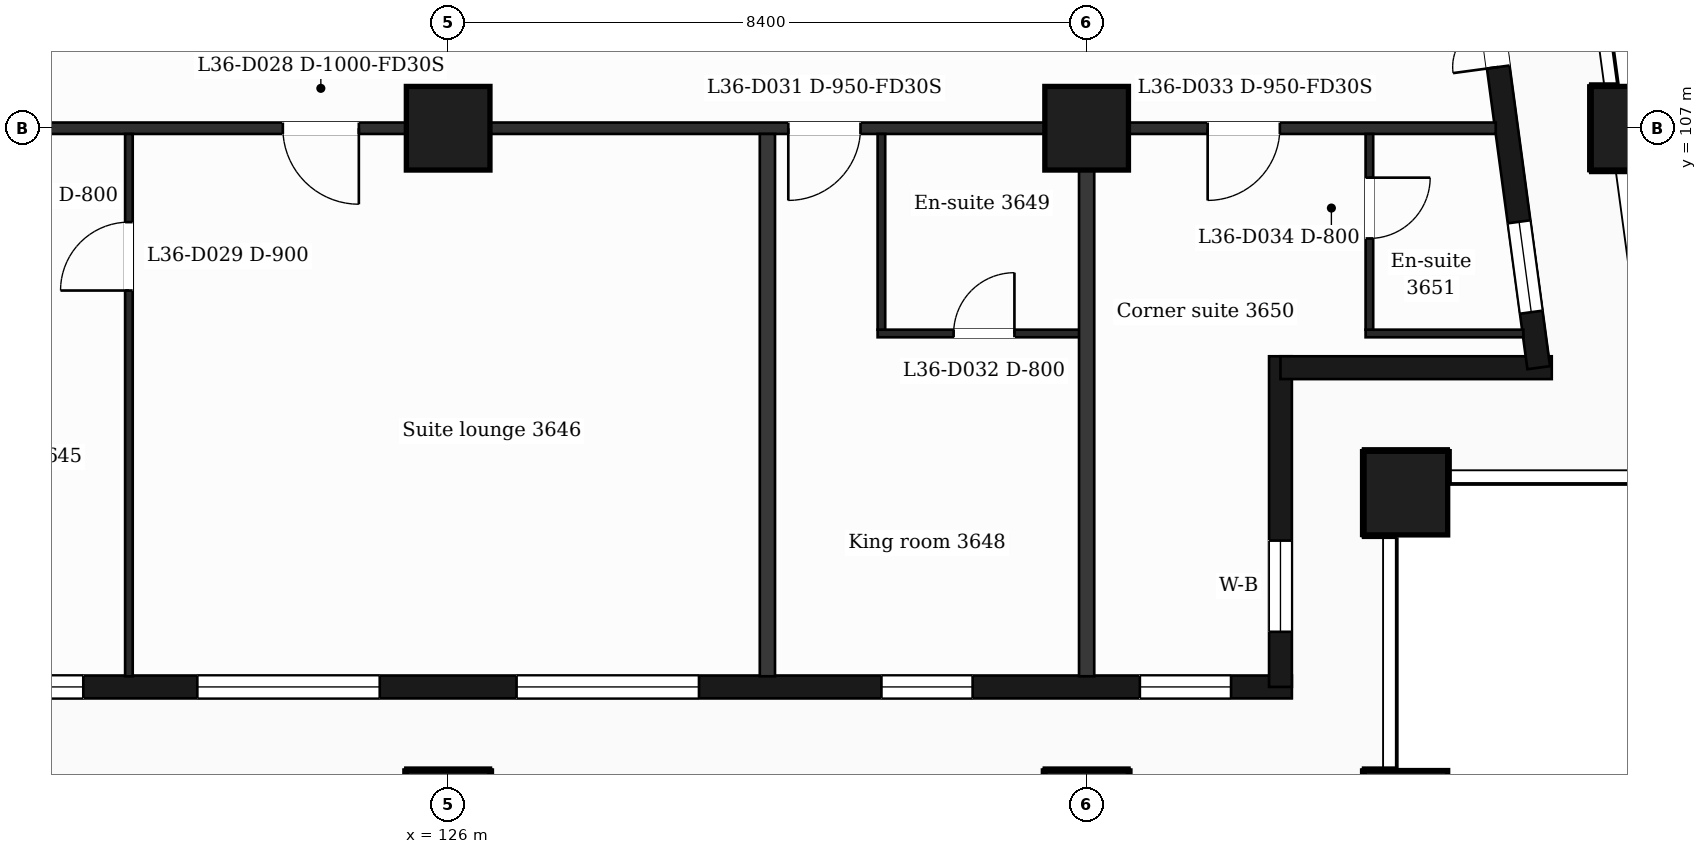
"""IFC4 building model, lengths in metres.
Left out: names, types, materials, properties, quantities, classifications, styles, units other than length and angle.
Written with IfcOpenShell. Run it as: python <this file> out.ifc"""

import sys

from ifc_helpers import new_model, si_unit, direction, frame, frame_2d, origin, origin_2d, place, context, subcontext, project, spatial, rectangle, extrude, element, fill, save


model = new_model("IFC4")
c1 = context("Model", 3, precision=1e-05, world=origin(), true_north=direction((0.0, 1.0)))
c2 = subcontext(c1, "Body", "Model", "MODEL_VIEW")
j1 = project(units=[si_unit("LENGTHUNIT", "METRE"), si_unit("PLANEANGLEUNIT", "RADIAN")], contexts=[c1])
p1 = place(None, origin())
s1 = spatial("IfcSite", under=j1, at=p1, CompositionType="ELEMENT")
p2 = place(p1, origin())
s2 = spatial("IfcBuilding", under=s1, at=p2, CompositionType="ELEMENT")
p3 = place(p2, frame((0.0, 0.0, 155.2)))
s3 = spatial("IfcBuildingStorey", under=s2, at=p3, CompositionType="ELEMENT", Elevation=155.2)
for number, where, z_axis, x_axis in (
    (1, (126.0, 98.0, 0.0), (0.0, 0.0, 1.0), (1.0, 0.0, 0.0)),
    (2, (134.4, 98.0, 0.0), (0.0, 0.0, 1.0), (1.0, 0.0, 0.0)),
    (3, (138.6, 98.0, 0.0), (0.0, 0.0, 1.0), (1.0, 0.0, 0.0)),
    (4, (138.6, 102.2, 0.0), (0.0, 0.0, 1.0), (1.0, 0.0, 0.0)),
    (5, (126.0, 107.0, 0.0), (0.0, 0.0, 1.0), (1.0, 0.0, 0.0)),
    (6, (134.4, 107.0, 0.0), (0.0, 0.0, 1.0), (1.0, 0.0, 0.0)),
    (7, (141.588, 107.0, 0.0), (0.0, 0.0, 1.0), (1.0, 0.0, 0.0)),
):
    element("IfcColumn", number, at=place(p3, frame(where, z_axis=z_axis, x_axis=x_axis)), inside=s3, PredefinedType="COLUMN", context=c2, shape_type="SweptSolid", body=[
        extrude(rectangle(XDim=1.1, YDim=1.1, at=origin_2d()), origin(), (0.0, 0.0, 1.0), 3.7),
    ])
p4 = place(p3, frame((89.85, 99.65, 0.0), z_axis=(0.0, 0.0, 1.0), x_axis=(1.0, 0.0, 0.0)))
e8 = element("IfcWall", 8, at=p4, inside=s3, PredefinedType="SOLIDWALL", context=c2, shape_type="SweptSolid", body=[
    extrude(rectangle(XDim=47.25, YDim=0.3, at=frame_2d((23.625, 0.0))), origin(), (0.0, 0.0, 1.0), 3.38),
])
p5 = place(p4, frame((0.725, 0.0, 0.9)))
e9 = element("IfcOpeningElement", 9, at=p5, cuts=e8, PredefinedType="OPENING", context=c2, shape_type="SweptSolid", body=[
    extrude(rectangle(XDim=1.2, YDim=2.1, at=frame_2d((0.6, 1.05))), frame((0.0, 0.16, 0.0), z_axis=(0.0, -1.0, 0.0), x_axis=(1.0, 0.0, 0.0)), (0.0, 0.0, 1.0), 0.32),
])
p6 = place(p4, frame((3.45, 0.0, 0.9)))
e10 = element("IfcOpeningElement", 10, at=p6, cuts=e8, PredefinedType="OPENING", context=c2, shape_type="SweptSolid", body=[
    extrude(rectangle(XDim=2.4, YDim=2.1, at=frame_2d((1.2, 1.05))), frame((0.0, 0.16, 0.0), z_axis=(0.0, -1.0, 0.0), x_axis=(1.0, 0.0, 0.0)), (0.0, 0.0, 1.0), 0.32),
])
p7 = place(p4, frame((7.65, 0.0, 0.9)))
e11 = element("IfcOpeningElement", 11, at=p7, cuts=e8, PredefinedType="OPENING", context=c2, shape_type="SweptSolid", body=[
    extrude(rectangle(XDim=2.4, YDim=2.1, at=frame_2d((1.2, 1.05))), frame((0.0, 0.16, 0.0), z_axis=(0.0, -1.0, 0.0), x_axis=(1.0, 0.0, 0.0)), (0.0, 0.0, 1.0), 0.32),
])
p8 = place(p4, frame((12.45, 0.0, 0.9)))
e12 = element("IfcOpeningElement", 12, at=p8, cuts=e8, PredefinedType="OPENING", context=c2, shape_type="SweptSolid", body=[
    extrude(rectangle(XDim=1.2, YDim=2.1, at=frame_2d((0.6, 1.05))), frame((0.0, 0.16, 0.0), z_axis=(0.0, -1.0, 0.0), x_axis=(1.0, 0.0, 0.0)), (0.0, 0.0, 1.0), 0.32),
])
p9 = place(p4, frame((16.65, 0.0, 0.9)))
e13 = element("IfcOpeningElement", 13, at=p9, cuts=e8, PredefinedType="OPENING", context=c2, shape_type="SweptSolid", body=[
    extrude(rectangle(XDim=1.2, YDim=2.1, at=frame_2d((0.6, 1.05))), frame((0.0, 0.16, 0.0), z_axis=(0.0, -1.0, 0.0), x_axis=(1.0, 0.0, 0.0)), (0.0, 0.0, 1.0), 0.32),
])
p10 = place(p4, frame((19.95, 0.0, 0.0)))
e14 = element("IfcOpeningElement", 14, at=p10, cuts=e8, PredefinedType="OPENING", context=c2, shape_type="SweptSolid", body=[
    extrude(rectangle(XDim=1.2, YDim=2.4, at=frame_2d((0.6, 1.2))), frame((0.0, 0.16, 0.0), z_axis=(0.0, -1.0, 0.0), x_axis=(1.0, 0.0, 0.0)), (0.0, 0.0, 1.0), 0.32),
])
p11 = place(p4, frame((21.75, 0.0, 0.9)))
e15 = element("IfcOpeningElement", 15, at=p11, cuts=e8, PredefinedType="OPENING", context=c2, shape_type="SweptSolid", body=[
    extrude(rectangle(XDim=1.2, YDim=2.1, at=frame_2d((0.6, 1.05))), frame((0.0, 0.16, 0.0), z_axis=(0.0, -1.0, 0.0), x_axis=(1.0, 0.0, 0.0)), (0.0, 0.0, 1.0), 0.32),
])
p12 = place(p4, frame((24.45, 0.0, 0.9)))
e16 = element("IfcOpeningElement", 16, at=p12, cuts=e8, PredefinedType="OPENING", context=c2, shape_type="SweptSolid", body=[
    extrude(rectangle(XDim=2.4, YDim=2.1, at=frame_2d((1.2, 1.05))), frame((0.0, 0.16, 0.0), z_axis=(0.0, -1.0, 0.0), x_axis=(1.0, 0.0, 0.0)), (0.0, 0.0, 1.0), 0.32),
])
p13 = place(p4, frame((28.35, 0.0, 0.0)))
e17 = element("IfcOpeningElement", 17, at=p13, cuts=e8, PredefinedType="OPENING", context=c2, shape_type="SweptSolid", body=[
    extrude(rectangle(XDim=1.2, YDim=2.4, at=frame_2d((0.6, 1.2))), frame((0.0, 0.16, 0.0), z_axis=(0.0, -1.0, 0.0), x_axis=(1.0, 0.0, 0.0)), (0.0, 0.0, 1.0), 0.32),
])
p14 = place(p4, frame((30.15, 0.0, 0.9)))
e18 = element("IfcOpeningElement", 18, at=p14, cuts=e8, PredefinedType="OPENING", context=c2, shape_type="SweptSolid", body=[
    extrude(rectangle(XDim=1.2, YDim=2.1, at=frame_2d((0.6, 1.05))), frame((0.0, 0.16, 0.0), z_axis=(0.0, -1.0, 0.0), x_axis=(1.0, 0.0, 0.0)), (0.0, 0.0, 1.0), 0.32),
])
p15 = place(p4, frame((32.85, 0.0, 0.9)))
e19 = element("IfcOpeningElement", 19, at=p15, cuts=e8, PredefinedType="OPENING", context=c2, shape_type="SweptSolid", body=[
    extrude(rectangle(XDim=2.4, YDim=2.1, at=frame_2d((1.2, 1.05))), frame((0.0, 0.16, 0.0), z_axis=(0.0, -1.0, 0.0), x_axis=(1.0, 0.0, 0.0)), (0.0, 0.0, 1.0), 0.32),
])
p16 = place(p4, frame((37.05, 0.0, 0.9)))
e20 = element("IfcOpeningElement", 20, at=p16, cuts=e8, PredefinedType="OPENING", context=c2, shape_type="SweptSolid", body=[
    extrude(rectangle(XDim=2.4, YDim=2.1, at=frame_2d((1.2, 1.05))), frame((0.0, 0.16, 0.0), z_axis=(0.0, -1.0, 0.0), x_axis=(1.0, 0.0, 0.0)), (0.0, 0.0, 1.0), 0.32),
])
p17 = place(p4, frame((41.85, 0.0, 0.9)))
e21 = element("IfcOpeningElement", 21, at=p17, cuts=e8, PredefinedType="OPENING", context=c2, shape_type="SweptSolid", body=[
    extrude(rectangle(XDim=1.2, YDim=2.1, at=frame_2d((0.6, 1.05))), frame((0.0, 0.16, 0.0), z_axis=(0.0, -1.0, 0.0), x_axis=(1.0, 0.0, 0.0)), (0.0, 0.0, 1.0), 0.32),
])
p18 = place(p4, frame((45.25, 0.0, 0.9)))
e22 = element("IfcOpeningElement", 22, at=p18, cuts=e8, PredefinedType="OPENING", context=c2, shape_type="SweptSolid", body=[
    extrude(rectangle(XDim=1.2, YDim=2.1, at=frame_2d((0.6, 1.05))), frame((0.0, 0.16, 0.0), z_axis=(0.0, -1.0, 0.0), x_axis=(1.0, 0.0, 0.0)), (0.0, 0.0, 1.0), 0.32),
])
p19 = place(p3, frame((136.95, 99.65, 0.0), z_axis=(0.0, 0.0, 1.0), x_axis=(0.0, 1.0, 0.0)))
e23 = element("IfcWall", 23, at=p19, inside=s3, PredefinedType="SOLIDWALL", context=c2, shape_type="SweptSolid", body=[
    extrude(rectangle(XDim=4.35, YDim=0.3, at=frame_2d((2.175, 0.0))), origin(), (0.0, 0.0, 1.0), 3.38),
])
p20 = place(p19, frame((0.725, 0.0, 0.9)))
e24 = element("IfcOpeningElement", 24, at=p20, cuts=e23, PredefinedType="OPENING", context=c2, shape_type="SweptSolid", body=[
    extrude(rectangle(XDim=1.2, YDim=2.1, at=frame_2d((0.6, 1.05))), frame((0.0, 0.16, 0.0), z_axis=(0.0, -1.0, 0.0), x_axis=(1.0, 0.0, 0.0)), (0.0, 0.0, 1.0), 0.32),
])
p21 = place(p3, frame((136.95, 103.85, 0.0), z_axis=(0.0, 0.0, 1.0), x_axis=(1.0, 0.0, 0.0)))
e25 = element("IfcWall", 25, at=p21, inside=s3, PredefinedType="SOLIDWALL", context=c2, shape_type="SweptSolid", body=[
    extrude(rectangle(XDim=3.569, YDim=0.3, at=frame_2d((1.785, 0.0))), origin(), (0.0, 0.0, 1.0), 3.38),
])
p22 = place(p3, frame((140.348, 103.85, 0.0), z_axis=(0.0, 0.0, 1.0), x_axis=(-0.133431549479, 0.991058031401, 0.0)))
e26 = element("IfcWall", 26, at=p22, inside=s3, PredefinedType="SOLIDWALL", context=c2, shape_type="SweptSolid", body=[
    extrude(rectangle(XDim=6.609, YDim=0.3, at=frame_2d((3.304, 0.0))), origin(), (0.0, 0.0, 1.0), 3.38),
])
p23 = place(p22, frame((0.737, 0.0, 0.9)))
e27 = element("IfcOpeningElement", 27, at=p23, cuts=e26, PredefinedType="OPENING", context=c2, shape_type="SweptSolid", body=[
    extrude(rectangle(XDim=1.2, YDim=2.1, at=frame_2d((0.6, 1.05))), frame((0.0, 0.16, 0.0), z_axis=(0.0, -1.0, 0.0), x_axis=(1.0, 0.0, 0.0)), (0.0, 0.0, 1.0), 0.32),
])
p24 = place(p22, frame((3.991, 0.0, 0.0)))
e28 = element("IfcOpeningElement", 28, at=p24, cuts=e26, PredefinedType="OPENING", context=c2, shape_type="SweptSolid", body=[
    extrude(rectangle(XDim=1.2, YDim=2.4, at=frame_2d((0.6, 1.2))), frame((0.0, 0.16, 0.0), z_axis=(0.0, -1.0, 0.0), x_axis=(1.0, 0.0, 0.0)), (0.0, 0.0, 1.0), 0.32),
])
p25 = place(p3, frame((131.65, 104.3, 0.0), z_axis=(0.0, 0.0, 1.0), x_axis=(1.0, 0.0, 0.0)))
e29 = element("IfcWall", 29, at=p25, inside=s3, PredefinedType="PARTITIONING", context=c2, shape_type="SweptSolid", body=[
    extrude(rectangle(XDim=2.75, YDim=0.1, at=frame_2d((1.375, 0.0))), origin(), (0.0, 0.0, 1.0), 3.38),
])
p26 = place(p25, frame((1.0, 0.0, 0.0)))
e30 = element("IfcOpeningElement", 30, at=p26, cuts=e29, PredefinedType="OPENING", context=c2, shape_type="SweptSolid", body=[
    extrude(rectangle(XDim=0.8, YDim=2.1, at=frame_2d((0.4, 1.05))), frame((0.0, 0.06, 0.0), z_axis=(0.0, -1.0, 0.0), x_axis=(1.0, 0.0, 0.0)), (0.0, 0.0, 1.0), 0.12),
])
p27 = place(p3, frame((138.07, 104.3, 0.0), z_axis=(0.0, 0.0, 1.0), x_axis=(1.0, 0.0, 0.0)))
e31 = element("IfcWall", 31, at=p27, inside=s3, PredefinedType="PARTITIONING", context=c2, shape_type="SweptSolid", body=[
    extrude(rectangle(XDim=2.076, YDim=0.1, at=frame_2d((1.038, 0.0))), origin(), (0.0, 0.0, 1.0), 3.38),
])
p28 = place(p3, frame((87.018, 107.0, 0.0), z_axis=(0.0, 0.0, 1.0), x_axis=(1.0, 0.0, 0.0)))
e32 = element("IfcWall", 32, at=p28, inside=s3, PredefinedType="PARTITIONING", context=c2, shape_type="SweptSolid", body=[
    extrude(rectangle(XDim=52.765, YDim=0.15, at=frame_2d((26.382, 0.0))), origin(), (0.0, 0.0, 1.0), 3.38),
])
p29 = place(p28, frame((0.707, 0.0, 0.0)))
e33 = element("IfcOpeningElement", 33, at=p29, cuts=e32, PredefinedType="OPENING", context=c2, shape_type="SweptSolid", body=[
    extrude(rectangle(XDim=0.95, YDim=2.1, at=frame_2d((0.475, 1.05))), frame((0.0, 0.085, 0.0), z_axis=(0.0, -1.0, 0.0), x_axis=(1.0, 0.0, 0.0)), (0.0, 0.0, 1.0), 0.17),
])
p30 = place(p28, frame((7.645, 0.0, 0.0)))
e34 = element("IfcOpeningElement", 34, at=p30, cuts=e32, PredefinedType="OPENING", context=c2, shape_type="SweptSolid", body=[
    extrude(rectangle(XDim=0.95, YDim=2.1, at=frame_2d((0.475, 1.05))), frame((0.0, 0.085, 0.0), z_axis=(0.0, -1.0, 0.0), x_axis=(1.0, 0.0, 0.0)), (0.0, 0.0, 1.0), 0.17),
])
p31 = place(p28, frame((12.067, 0.0, 0.0)))
e35 = element("IfcOpeningElement", 35, at=p31, cuts=e32, PredefinedType="OPENING", context=c2, shape_type="SweptSolid", body=[
    extrude(rectangle(XDim=0.95, YDim=2.1, at=frame_2d((0.475, 1.05))), frame((0.0, 0.085, 0.0), z_axis=(0.0, -1.0, 0.0), x_axis=(1.0, 0.0, 0.0)), (0.0, 0.0, 1.0), 0.17),
])
p32 = place(p28, frame((14.582, 0.0, 0.0)))
e36 = element("IfcOpeningElement", 36, at=p32, cuts=e32, PredefinedType="OPENING", context=c2, shape_type="SweptSolid", body=[
    extrude(rectangle(XDim=0.95, YDim=2.1, at=frame_2d((0.475, 1.05))), frame((0.0, 0.085, 0.0), z_axis=(0.0, -1.0, 0.0), x_axis=(1.0, 0.0, 0.0)), (0.0, 0.0, 1.0), 0.17),
])
p33 = place(p28, frame((20.432, 0.0, 0.0)))
e37 = element("IfcOpeningElement", 37, at=p33, cuts=e32, PredefinedType="OPENING", context=c2, shape_type="SweptSolid", body=[
    extrude(rectangle(XDim=0.95, YDim=2.1, at=frame_2d((0.475, 1.05))), frame((0.0, 0.085, 0.0), z_axis=(0.0, -1.0, 0.0), x_axis=(1.0, 0.0, 0.0)), (0.0, 0.0, 1.0), 0.17),
])
p34 = place(p28, frame((23.532, 0.0, 0.0)))
e38 = element("IfcOpeningElement", 38, at=p34, cuts=e32, PredefinedType="OPENING", context=c2, shape_type="SweptSolid", body=[
    extrude(rectangle(XDim=1.0, YDim=2.1, at=frame_2d((0.5, 1.05))), frame((0.0, 0.085, 0.0), z_axis=(0.0, -1.0, 0.0), x_axis=(1.0, 0.0, 0.0)), (0.0, 0.0, 1.0), 0.17),
])
p35 = place(p28, frame((36.807, 0.0, 0.0)))
e39 = element("IfcOpeningElement", 39, at=p35, cuts=e32, PredefinedType="OPENING", context=c2, shape_type="SweptSolid", body=[
    extrude(rectangle(XDim=1.0, YDim=2.1, at=frame_2d((0.5, 1.05))), frame((0.0, 0.085, 0.0), z_axis=(0.0, -1.0, 0.0), x_axis=(1.0, 0.0, 0.0)), (0.0, 0.0, 1.0), 0.17),
])
p36 = place(p28, frame((43.457, 0.0, 0.0)))
e40 = element("IfcOpeningElement", 40, at=p36, cuts=e32, PredefinedType="OPENING", context=c2, shape_type="SweptSolid", body=[
    extrude(rectangle(XDim=0.95, YDim=2.1, at=frame_2d((0.475, 1.05))), frame((0.0, 0.085, 0.0), z_axis=(0.0, -1.0, 0.0), x_axis=(1.0, 0.0, 0.0)), (0.0, 0.0, 1.0), 0.17),
])
p37 = place(p28, frame((48.974, 0.0, 0.0)))
e41 = element("IfcOpeningElement", 41, at=p37, cuts=e32, PredefinedType="OPENING", context=c2, shape_type="SweptSolid", body=[
    extrude(rectangle(XDim=0.95, YDim=2.1, at=frame_2d((0.475, 1.05))), frame((0.0, 0.085, 0.0), z_axis=(0.0, -1.0, 0.0), x_axis=(1.0, 0.0, 0.0)), (0.0, 0.0, 1.0), 0.17),
])
p38 = place(p3, frame((121.8, 99.79, 0.0), z_axis=(0.0, 0.0, 1.0), x_axis=(0.0, 1.0, 0.0)))
e42 = element("IfcWall", 42, at=p38, inside=s3, PredefinedType="PARTITIONING", context=c2, shape_type="SweptSolid", body=[
    extrude(rectangle(XDim=7.135, YDim=0.1, at=frame_2d((3.567, 0.0))), origin(), (0.0, 0.0, 1.0), 3.38),
])
p39 = place(p38, frame((5.075, 0.0, 0.0)))
e43 = element("IfcOpeningElement", 43, at=p39, cuts=e42, PredefinedType="OPENING", context=c2, shape_type="SweptSolid", body=[
    extrude(rectangle(XDim=0.9, YDim=2.1, at=frame_2d((0.45, 1.05))), frame((0.0, 0.06, 0.0), z_axis=(0.0, -1.0, 0.0), x_axis=(1.0, 0.0, 0.0)), (0.0, 0.0, 1.0), 0.12),
])
p40 = place(p3, frame((130.2, 99.79, 0.0), z_axis=(0.0, 0.0, 1.0), x_axis=(0.0, 1.0, 0.0)))
e44 = element("IfcWall", 44, at=p40, inside=s3, PredefinedType="PARTITIONING", context=c2, shape_type="SweptSolid", body=[
    extrude(rectangle(XDim=7.135, YDim=0.2, at=frame_2d((3.567, 0.0))), origin(), (0.0, 0.0, 1.0), 3.38),
])
p41 = place(p3, frame((131.7, 104.35, 0.0), z_axis=(0.0, 0.0, 1.0), x_axis=(0.0, 1.0, 0.0)))
e45 = element("IfcWall", 45, at=p41, inside=s3, PredefinedType="PARTITIONING", context=c2, shape_type="SweptSolid", body=[
    extrude(rectangle(XDim=2.575, YDim=0.1, at=frame_2d((1.288, 0.0))), origin(), (0.0, 0.0, 1.0), 3.38),
])
p42 = place(p3, frame((134.4, 99.79, 0.0), z_axis=(0.0, 0.0, 1.0), x_axis=(0.0, 1.0, 0.0)))
e46 = element("IfcWall", 46, at=p42, inside=s3, PredefinedType="PARTITIONING", context=c2, shape_type="SweptSolid", body=[
    extrude(rectangle(XDim=7.135, YDim=0.2, at=frame_2d((3.567, 0.0))), origin(), (0.0, 0.0, 1.0), 3.38),
])
p43 = place(p3, frame((138.12, 104.35, 0.0), z_axis=(0.0, 0.0, 1.0), x_axis=(0.0, 1.0, 0.0)))
e47 = element("IfcWall", 47, at=p43, inside=s3, PredefinedType="PARTITIONING", context=c2, shape_type="SweptSolid", body=[
    extrude(rectangle(XDim=2.575, YDim=0.1, at=frame_2d((1.288, 0.0))), origin(), (0.0, 0.0, 1.0), 3.38),
])
p44 = place(p43, frame((1.2, 0.0, 0.0)))
e48 = element("IfcOpeningElement", 48, at=p44, cuts=e47, PredefinedType="OPENING", context=c2, shape_type="SweptSolid", body=[
    extrude(rectangle(XDim=0.8, YDim=2.1, at=frame_2d((0.4, 1.05))), frame((0.0, 0.06, 0.0), z_axis=(0.0, -1.0, 0.0), x_axis=(1.0, 0.0, 0.0)), (0.0, 0.0, 1.0), 0.12),
])
p45 = place(p14, origin())
e49 = element("IfcWindow", 49, at=p45, inside=s3, PartitioningType="SINGLE_PANEL", PredefinedType="WINDOW", context=c2, shape_type="SweptSolid", body=[
    extrude(rectangle(XDim=1.2, YDim=2.1, at=frame_2d((0.6, 1.05))), frame((0.0, 0.03, 0.0), z_axis=(0.0, -1.0, 0.0), x_axis=(1.0, 0.0, 0.0)), (0.0, 0.0, 1.0), 0.06),
])
fill(e18, e49)
p46 = place(p15, origin())
e50 = element("IfcWindow", 50, at=p46, inside=s3, PartitioningType="SINGLE_PANEL", PredefinedType="WINDOW", context=c2, shape_type="SweptSolid", body=[
    extrude(rectangle(XDim=2.4, YDim=2.1, at=frame_2d((1.2, 1.05))), frame((0.0, 0.03, 0.0), z_axis=(0.0, -1.0, 0.0), x_axis=(1.0, 0.0, 0.0)), (0.0, 0.0, 1.0), 0.06),
])
fill(e19, e50)
p47 = place(p16, origin())
e51 = element("IfcWindow", 51, at=p47, inside=s3, PartitioningType="SINGLE_PANEL", PredefinedType="WINDOW", context=c2, shape_type="SweptSolid", body=[
    extrude(rectangle(XDim=2.4, YDim=2.1, at=frame_2d((1.2, 1.05))), frame((0.0, 0.03, 0.0), z_axis=(0.0, -1.0, 0.0), x_axis=(1.0, 0.0, 0.0)), (0.0, 0.0, 1.0), 0.06),
])
fill(e20, e51)
p48 = place(p17, origin())
e52 = element("IfcWindow", 52, at=p48, inside=s3, PartitioningType="SINGLE_PANEL", PredefinedType="WINDOW", context=c2, shape_type="SweptSolid", body=[
    extrude(rectangle(XDim=1.2, YDim=2.1, at=frame_2d((0.6, 1.05))), frame((0.0, 0.03, 0.0), z_axis=(0.0, -1.0, 0.0), x_axis=(1.0, 0.0, 0.0)), (0.0, 0.0, 1.0), 0.06),
])
fill(e21, e52)
p49 = place(p18, origin())
e53 = element("IfcWindow", 53, at=p49, inside=s3, PartitioningType="SINGLE_PANEL", PredefinedType="WINDOW", context=c2, shape_type="SweptSolid", body=[
    extrude(rectangle(XDim=1.2, YDim=2.1, at=frame_2d((0.6, 1.05))), frame((0.0, 0.03, 0.0), z_axis=(0.0, -1.0, 0.0), x_axis=(1.0, 0.0, 0.0)), (0.0, 0.0, 1.0), 0.06),
])
fill(e22, e53)
p50 = place(p20, origin())
e54 = element("IfcWindow", 54, at=p50, inside=s3, PartitioningType="SINGLE_PANEL", PredefinedType="WINDOW", context=c2, shape_type="SweptSolid", body=[
    extrude(rectangle(XDim=1.2, YDim=2.1, at=frame_2d((0.6, 1.05))), frame((0.0, 0.03, 0.0), z_axis=(0.0, -1.0, 0.0), x_axis=(1.0, 0.0, 0.0)), (0.0, 0.0, 1.0), 0.06),
])
fill(e24, e54)
p51 = place(p23, origin())
e55 = element("IfcWindow", 55, at=p51, inside=s3, PartitioningType="SINGLE_PANEL", PredefinedType="WINDOW", context=c2, shape_type="SweptSolid", body=[
    extrude(rectangle(XDim=1.2, YDim=2.1, at=frame_2d((0.6, 1.05))), frame((0.0, 0.03, 0.0), z_axis=(0.0, -1.0, 0.0), x_axis=(1.0, 0.0, 0.0)), (0.0, 0.0, 1.0), 0.06),
])
fill(e27, e55)
p52 = place(p24, origin())
e56 = element("IfcDoor", 56, at=p52, inside=s3, OperationType="DOUBLE_DOOR_SINGLE_SWING", PredefinedType="DOOR", context=c2, shape_type="SweptSolid", body=[
    extrude(rectangle(XDim=1.2, YDim=2.4, at=frame_2d((0.6, 1.2))), frame((0.0, 0.025, 0.0), z_axis=(0.0, -1.0, 0.0), x_axis=(1.0, 0.0, 0.0)), (0.0, 0.0, 1.0), 0.05),
])
fill(e28, e56)
p53 = place(p35, origin())
e57 = element("IfcDoor", 57, at=p53, inside=s3, OperationType="SINGLE_SWING_RIGHT", PredefinedType="DOOR", context=c2, shape_type="SweptSolid", body=[
    extrude(rectangle(XDim=1.0, YDim=2.1, at=frame_2d((0.5, 1.05))), frame((0.0, 0.025, 0.0), z_axis=(0.0, -1.0, 0.0), x_axis=(1.0, 0.0, 0.0)), (0.0, 0.0, 1.0), 0.05),
])
fill(e39, e57)
p54 = place(p39, origin())
e58 = element("IfcDoor", 58, at=p54, inside=s3, OperationType="SINGLE_SWING_LEFT", PredefinedType="DOOR", context=c2, shape_type="SweptSolid", body=[
    extrude(rectangle(XDim=0.9, YDim=2.1, at=frame_2d((0.45, 1.05))), frame((0.0, 0.025, 0.0), z_axis=(0.0, -1.0, 0.0), x_axis=(1.0, 0.0, 0.0)), (0.0, 0.0, 1.0), 0.05),
])
fill(e43, e58)
p55 = place(p36, origin())
e59 = element("IfcDoor", 59, at=p55, inside=s3, OperationType="SINGLE_SWING_LEFT", PredefinedType="DOOR", context=c2, shape_type="SweptSolid", body=[
    extrude(rectangle(XDim=0.95, YDim=2.1, at=frame_2d((0.475, 1.05))), frame((0.0, 0.025, 0.0), z_axis=(0.0, -1.0, 0.0), x_axis=(1.0, 0.0, 0.0)), (0.0, 0.0, 1.0), 0.05),
])
fill(e40, e59)
p56 = place(p26, origin())
e60 = element("IfcDoor", 60, at=p56, inside=s3, OperationType="SINGLE_SWING_RIGHT", PredefinedType="DOOR", context=c2, shape_type="SweptSolid", body=[
    extrude(rectangle(XDim=0.8, YDim=2.1, at=frame_2d((0.4, 1.05))), frame((0.0, 0.025, 0.0), z_axis=(0.0, -1.0, 0.0), x_axis=(1.0, 0.0, 0.0)), (0.0, 0.0, 1.0), 0.05),
])
fill(e30, e60)
p57 = place(p37, origin())
e61 = element("IfcDoor", 61, at=p57, inside=s3, OperationType="SINGLE_SWING_LEFT", PredefinedType="DOOR", context=c2, shape_type="SweptSolid", body=[
    extrude(rectangle(XDim=0.95, YDim=2.1, at=frame_2d((0.475, 1.05))), frame((0.0, 0.025, 0.0), z_axis=(0.0, -1.0, 0.0), x_axis=(1.0, 0.0, 0.0)), (0.0, 0.0, 1.0), 0.05),
])
fill(e41, e61)
p58 = place(p44, origin())
e62 = element("IfcDoor", 62, at=p58, inside=s3, OperationType="SINGLE_SWING_RIGHT", PredefinedType="DOOR", context=c2, shape_type="SweptSolid", body=[
    extrude(rectangle(XDim=0.8, YDim=2.1, at=frame_2d((0.4, 1.05))), frame((0.0, 0.025, 0.0), z_axis=(0.0, -1.0, 0.0), x_axis=(1.0, 0.0, 0.0)), (0.0, 0.0, 1.0), 0.05),
])
fill(e48, e62)
save(model, sys.argv[1])
